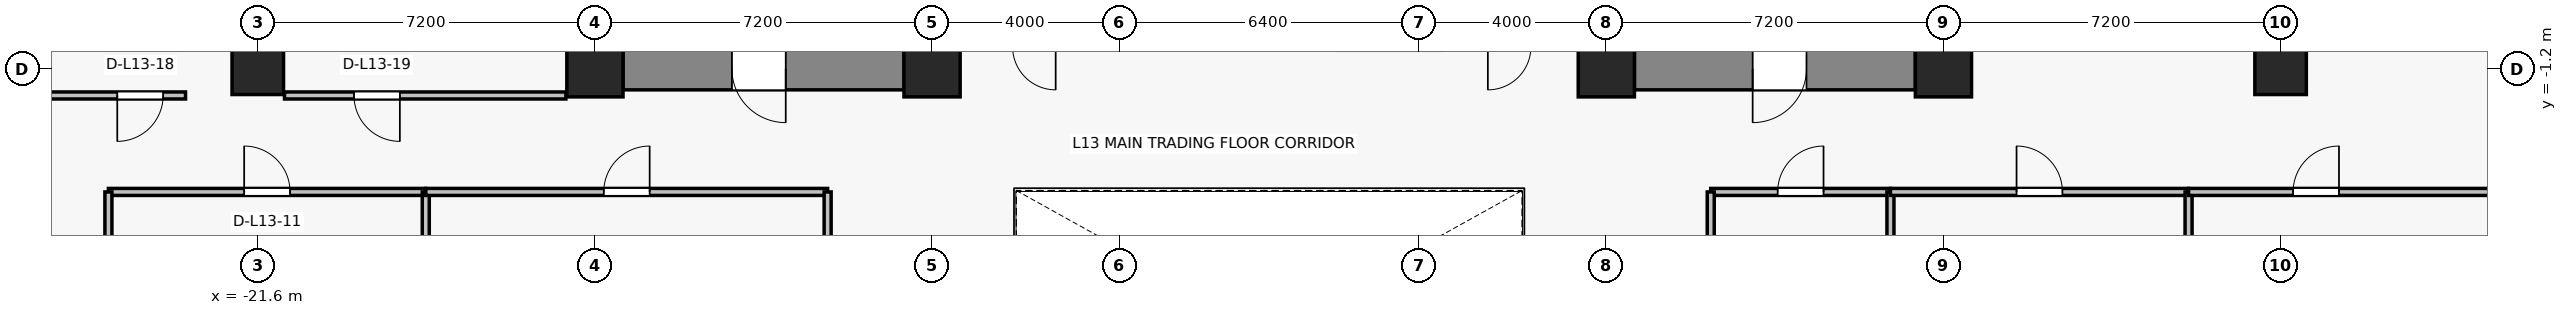
"""IFC4 building model, lengths in metres.
Left out: names, types, materials, properties, quantities, classifications, styles, units other than length and angle.
Written with IfcOpenShell. Run it as: python <this file> out.ifc"""

import sys

from ifc_helpers import new_model, si_unit, direction, frame, frame_2d, origin, origin_2d, place, context, subcontext, project, spatial, rectangle, extrude, source, transform, mapped, element, fill, save


model = new_model("IFC4")
c1 = context("Model", 3, precision=1e-05, world=origin(), true_north=direction((0.0, 1.0)))
c2 = subcontext(c1, "Body", "Model", "MODEL_VIEW")
j1 = project(units=[si_unit("LENGTHUNIT", "METRE"), si_unit("PLANEANGLEUNIT", "RADIAN")], contexts=[c1])
p1 = place(None, origin())
s1 = spatial("IfcSite", under=j1, at=p1, CompositionType="ELEMENT")
p2 = place(p1, origin())
s2 = spatial("IfcBuilding", under=s1, at=p2, CompositionType="ELEMENT")
p3 = place(p2, frame((0.0, 0.0, 50.5)))
s3 = spatial("IfcBuildingStorey", under=s2, at=p3, CompositionType="ELEMENT", Elevation=50.5)
for number, where, z_axis, x_axis in (
    (1, (-14.4, -1.2, 0.0), (0.0, 0.0, 1.0), (1.0, 0.0, 0.0)),
    (2, (-7.2, -1.2, 0.0), (0.0, 0.0, 1.0), (1.0, 0.0, 0.0)),
    (3, (7.2, -1.2, 0.0), (0.0, 0.0, 1.0), (1.0, 0.0, 0.0)),
    (4, (14.4, -1.2, 0.0), (0.0, 0.0, 1.0), (1.0, 0.0, 0.0)),
):
    element("IfcColumn", number, at=place(p3, frame(where, z_axis=z_axis, x_axis=x_axis)), inside=s3, PredefinedType="COLUMN", context=c2, shape_type="SweptSolid", body=[
        extrude(rectangle(XDim=1.2, YDim=1.2, at=origin_2d()), origin(), (0.0, 0.0, 1.0), 3.3),
    ])
for number, where, z_axis, x_axis in (
    (5, (-21.6, -1.2, 0.0), (0.0, 0.0, 1.0), (1.0, 0.0, 0.0)),
    (6, (21.6, -1.2, 0.0), (0.0, 0.0, 1.0), (1.0, 0.0, 0.0)),
):
    element("IfcColumn", number, at=place(p3, frame(where, z_axis=z_axis, x_axis=x_axis)), inside=s3, PredefinedType="COLUMN", context=c2, shape_type="SweptSolid", body=[
        extrude(rectangle(XDim=1.1, YDim=1.1, at=origin_2d()), origin(), (0.0, 0.0, 1.0), 3.3),
    ])
p4 = place(p3, frame((-7.8, -1.2, 0.0), z_axis=(0.0, 0.0, 1.0), x_axis=(-1.0, 0.0, 0.0)))
e7 = element("IfcWall", 7, at=p4, inside=s3, PredefinedType="SHEAR", context=c2, shape_type="SweptSolid", body=[
    extrude(rectangle(XDim=6.0, YDim=0.9, at=frame_2d((3.0, 0.0))), origin(), (0.0, 0.0, 1.0), 3.075),
])
p5 = place(p4, frame((2.525, 0.0, 0.0)))
e8 = element("IfcOpeningElement", 8, at=p5, cuts=e7, PredefinedType="OPENING", context=c2, shape_type="SweptSolid", body=[
    extrude(rectangle(XDim=1.15, YDim=2.15, at=frame_2d((0.575, 1.075))), frame((0.0, 0.46, 0.0), z_axis=(0.0, -1.0, 0.0), x_axis=(1.0, 0.0, 0.0)), (0.0, 0.0, 1.0), 0.92),
])
p6 = place(p3, frame((13.8, -1.2, 0.0), z_axis=(0.0, 0.0, 1.0), x_axis=(-1.0, 0.0, 0.0)))
e9 = element("IfcWall", 9, at=p6, inside=s3, PredefinedType="SHEAR", context=c2, shape_type="SweptSolid", body=[
    extrude(rectangle(XDim=6.0, YDim=0.9, at=frame_2d((3.0, 0.0))), origin(), (0.0, 0.0, 1.0), 3.075),
])
p7 = place(p6, frame((2.325, 0.0, 0.0)))
e10 = element("IfcOpeningElement", 10, at=p7, cuts=e9, PredefinedType="OPENING", context=c2, shape_type="SweptSolid", body=[
    extrude(rectangle(XDim=1.15, YDim=2.15, at=frame_2d((0.575, 1.075))), frame((0.0, 0.46, 0.0), z_axis=(0.0, -1.0, 0.0), x_axis=(1.0, 0.0, 0.0)), (0.0, 0.0, 1.0), 0.92),
])
p8 = place(p3, frame((-24.79, -3.83, 0.0), z_axis=(0.0, 0.0, 1.0), x_axis=(1.0, 0.0, 0.0)))
e11 = element("IfcWall", 11, at=p8, inside=s3, PredefinedType="PARTITIONING", context=c2, shape_type="SweptSolid", body=[
    extrude(rectangle(XDim=6.778, YDim=0.15, at=frame_2d((3.389, 0.0))), origin(), (0.0, 0.0, 1.0), 2.465),
])
p9 = place(p8, frame((2.899, 0.0, 0.0)))
e12 = element("IfcOpeningElement", 12, at=p9, cuts=e11, PredefinedType="OPENING", context=c2, shape_type="SweptSolid", body=[
    extrude(rectangle(XDim=0.98, YDim=2.15, at=frame_2d((0.49, 1.075))), frame((0.0, 0.085, 0.0), z_axis=(0.0, -1.0, 0.0), x_axis=(1.0, 0.0, 0.0)), (0.0, 0.0, 1.0), 0.17),
])
for number, where, z_axis, x_axis in (
    (13, (-24.79, -8.12, 0.0), (0.0, 0.0, 1.0), (0.0, 1.0, 0.0)),
    (14, (-18.012, -3.83, 0.0), (0.0, 0.0, 1.0), (0.0, -1.0, 0.0)),
):
    element("IfcWall", number, at=place(p3, frame(where, z_axis=z_axis, x_axis=x_axis)), inside=s3, PredefinedType="PARTITIONING", context=c2, shape_type="SweptSolid", body=[
        extrude(rectangle(XDim=4.29, YDim=0.15, at=frame_2d((2.145, 0.0))), origin(), (0.0, 0.0, 1.0), 2.565),
    ])
p10 = place(p3, frame((-18.012, -3.83, 0.0), z_axis=(0.0, 0.0, 1.0), x_axis=(1.0, 0.0, 0.0)))
e15 = element("IfcWall", 15, at=p10, inside=s3, PredefinedType="PARTITIONING", context=c2, shape_type="SweptSolid", body=[
    extrude(rectangle(XDim=8.583, YDim=0.15, at=frame_2d((4.291, 0.0))), origin(), (0.0, 0.0, 1.0), 2.465),
])
p11 = place(p10, frame((3.802, 0.0, 0.0)))
e16 = element("IfcOpeningElement", 16, at=p11, cuts=e15, PredefinedType="OPENING", context=c2, shape_type="SweptSolid", body=[
    extrude(rectangle(XDim=0.98, YDim=2.15, at=frame_2d((0.49, 1.075))), frame((0.0, 0.085, 0.0), z_axis=(0.0, -1.0, 0.0), x_axis=(1.0, 0.0, 0.0)), (0.0, 0.0, 1.0), 0.17),
])
p12 = place(p3, frame((-9.43, -3.83, 0.0), z_axis=(0.0, 0.0, 1.0), x_axis=(0.0, -1.0, 0.0)))
e17 = element("IfcWall", 17, at=p12, inside=s3, PredefinedType="PARTITIONING", context=c2, shape_type="SweptSolid", body=[
    extrude(rectangle(XDim=4.29, YDim=0.15, at=frame_2d((2.145, 0.0))), origin(), (0.0, 0.0, 1.0), 2.565),
])
p13 = place(p3, frame((9.43, -3.83, 0.0), z_axis=(0.0, 0.0, 1.0), x_axis=(1.0, 0.0, 0.0)))
e18 = element("IfcWall", 18, at=p13, inside=s3, PredefinedType="PARTITIONING", context=c2, shape_type="SweptSolid", body=[
    extrude(rectangle(XDim=3.838, YDim=0.15, at=frame_2d((1.919, 0.0))), origin(), (0.0, 0.0, 1.0), 3.075),
])
p14 = place(p13, frame((1.429, 0.0, 0.0)))
e19 = element("IfcOpeningElement", 19, at=p14, cuts=e18, PredefinedType="OPENING", context=c2, shape_type="SweptSolid", body=[
    extrude(rectangle(XDim=0.98, YDim=2.15, at=frame_2d((0.49, 1.075))), frame((0.0, 0.085, 0.0), z_axis=(0.0, -1.0, 0.0), x_axis=(1.0, 0.0, 0.0)), (0.0, 0.0, 1.0), 0.17),
])
for number, where, z_axis, x_axis in (
    (20, (9.43, -8.12, 0.0), (0.0, 0.0, 1.0), (0.0, 1.0, 0.0)),
    (21, (13.268, -3.83, 0.0), (0.0, 0.0, 1.0), (0.0, -1.0, 0.0)),
):
    element("IfcWall", number, at=place(p3, frame(where, z_axis=z_axis, x_axis=x_axis)), inside=s3, PredefinedType="PARTITIONING", context=c2, shape_type="SweptSolid", body=[
        extrude(rectangle(XDim=4.29, YDim=0.15, at=frame_2d((2.145, 0.0))), origin(), (0.0, 0.0, 1.0), 2.565),
    ])
p15 = place(p3, frame((13.268, -3.83, 0.0), z_axis=(0.0, 0.0, 1.0), x_axis=(1.0, 0.0, 0.0)))
e22 = element("IfcWall", 22, at=p15, inside=s3, PredefinedType="PARTITIONING", context=c2, shape_type="SweptSolid", body=[
    extrude(rectangle(XDim=6.367, YDim=0.15, at=frame_2d((3.183, 0.0))), origin(), (0.0, 0.0, 1.0), 2.465),
])
p16 = place(p15, frame((2.693, 0.0, 0.0)))
e23 = element("IfcOpeningElement", 23, at=p16, cuts=e22, PredefinedType="OPENING", context=c2, shape_type="SweptSolid", body=[
    extrude(rectangle(XDim=0.98, YDim=2.15, at=frame_2d((0.49, 1.075))), frame((0.0, 0.085, 0.0), z_axis=(0.0, -1.0, 0.0), x_axis=(1.0, 0.0, 0.0)), (0.0, 0.0, 1.0), 0.17),
])
p17 = place(p3, frame((19.635, -3.83, 0.0), z_axis=(0.0, 0.0, 1.0), x_axis=(0.0, -1.0, 0.0)))
e24 = element("IfcWall", 24, at=p17, inside=s3, PredefinedType="PARTITIONING", context=c2, shape_type="SweptSolid", body=[
    extrude(rectangle(XDim=4.29, YDim=0.15, at=frame_2d((2.145, 0.0))), origin(), (0.0, 0.0, 1.0), 2.565),
])
p18 = place(p3, frame((19.635, -3.83, 0.0), z_axis=(0.0, 0.0, 1.0), x_axis=(1.0, 0.0, 0.0)))
e25 = element("IfcWall", 25, at=p18, inside=s3, PredefinedType="PARTITIONING", context=c2, shape_type="SweptSolid", body=[
    extrude(rectangle(XDim=8.895, YDim=0.15, at=frame_2d((4.448, 0.0))), origin(), (0.0, 0.0, 1.0), 2.465),
])
p19 = place(p18, frame((2.232, 0.0, 0.0)))
e26 = element("IfcOpeningElement", 26, at=p19, cuts=e25, PredefinedType="OPENING", context=c2, shape_type="SweptSolid", body=[
    extrude(rectangle(XDim=0.98, YDim=2.15, at=frame_2d((0.49, 1.075))), frame((0.0, 0.085, 0.0), z_axis=(0.0, -1.0, 0.0), x_axis=(1.0, 0.0, 0.0)), (0.0, 0.0, 1.0), 0.17),
])
p20 = place(p3, frame((-23.143, -1.77, 0.0), z_axis=(0.0, 0.0, 1.0), x_axis=(-1.0, 0.0, 0.0)))
e27 = element("IfcWall", 27, at=p20, inside=s3, PredefinedType="PARTITIONING", context=c2, shape_type="SweptSolid", body=[
    extrude(rectangle(XDim=5.853, YDim=0.15, at=frame_2d((2.927, 0.0))), origin(), (0.0, 0.0, 1.0), 2.465),
])
p21 = place(p20, frame((0.478, 0.0, 0.0)))
e28 = element("IfcOpeningElement", 28, at=p21, cuts=e27, PredefinedType="OPENING", context=c2, shape_type="SweptSolid", body=[
    extrude(rectangle(XDim=0.98, YDim=2.15, at=frame_2d((0.49, 1.075))), frame((0.0, 0.085, 0.0), z_axis=(0.0, -1.0, 0.0), x_axis=(1.0, 0.0, 0.0)), (0.0, 0.0, 1.0), 0.17),
])
p22 = place(p3, frame((-15.02, -1.77, 0.0), z_axis=(0.0, 0.0, 1.0), x_axis=(-1.0, 0.0, 0.0)))
e29 = element("IfcWall", 29, at=p22, inside=s3, PredefinedType="PARTITIONING", context=c2, shape_type="SweptSolid", body=[
    extrude(rectangle(XDim=6.01, YDim=0.15, at=frame_2d((3.005, 0.0))), origin(), (0.0, 0.0, 1.0), 3.075),
])
p23 = place(p22, frame((3.546, 0.0, 0.0)))
e30 = element("IfcOpeningElement", 30, at=p23, cuts=e29, PredefinedType="OPENING", context=c2, shape_type="SweptSolid", body=[
    extrude(rectangle(XDim=0.98, YDim=2.15, at=frame_2d((0.49, 1.075))), frame((0.0, 0.085, 0.0), z_axis=(0.0, -1.0, 0.0), x_axis=(1.0, 0.0, 0.0)), (0.0, 0.0, 1.0), 0.17),
])
m1 = source(origin(), c2, "Body", "SweptSolid", [
    extrude(rectangle(XDim=1.15, YDim=2.15, at=frame_2d((0.575, 1.075))), frame((0.0, 0.025, 0.0), z_axis=(0.0, -1.0, 0.0), x_axis=(1.0, 0.0, 0.0)), (0.0, 0.0, 1.0), 0.05),
])
p24 = place(p5, origin())
e31 = element("IfcDoor", 31, at=p24, inside=s3, OperationType="SINGLE_SWING_LEFT", PredefinedType="DOOR", context=c2, shape_type="MappedRepresentation", body=[
    mapped(m1, transform((0.0, 0.0, 0.0), x_axis=(1.0, 0.0, 0.0), y_axis=(0.0, 1.0, 0.0), z_axis=(0.0, 0.0, 1.0), scale=1.0)),
])
fill(e8, e31)
p25 = place(p7, origin())
e32 = element("IfcDoor", 32, at=p25, inside=s3, OperationType="SINGLE_SWING_RIGHT", PredefinedType="DOOR", context=c2, shape_type="MappedRepresentation", body=[
    mapped(m1, transform((0.0, 0.0, 0.0), x_axis=(1.0, 0.0, 0.0), y_axis=(0.0, 1.0, 0.0), z_axis=(0.0, 0.0, 1.0), scale=1.0)),
])
fill(e10, e32)
m2 = source(origin(), c2, "Body", "SweptSolid", [
    extrude(rectangle(XDim=0.98, YDim=2.15, at=frame_2d((0.49, 1.075))), frame((0.0, 0.025, 0.0), z_axis=(0.0, -1.0, 0.0), x_axis=(1.0, 0.0, 0.0)), (0.0, 0.0, 1.0), 0.05),
])
p26 = place(p9, origin())
e33 = element("IfcDoor", 33, at=p26, inside=s3, OperationType="SINGLE_SWING_LEFT", PredefinedType="DOOR", context=c2, shape_type="MappedRepresentation", body=[
    mapped(m2, transform((0.0, 0.0, 0.0), x_axis=(1.0, 0.0, 0.0), y_axis=(0.0, 1.0, 0.0), z_axis=(0.0, 0.0, 1.0), scale=1.0)),
])
fill(e12, e33)
p27 = place(p11, origin())
e34 = element("IfcDoor", 34, at=p27, inside=s3, OperationType="SINGLE_SWING_RIGHT", PredefinedType="DOOR", context=c2, shape_type="MappedRepresentation", body=[
    mapped(m2, transform((0.0, 0.0, 0.0), x_axis=(1.0, 0.0, 0.0), y_axis=(0.0, 1.0, 0.0), z_axis=(0.0, 0.0, 1.0), scale=1.0)),
])
fill(e16, e34)
p28 = place(p14, origin())
e35 = element("IfcDoor", 35, at=p28, inside=s3, OperationType="SINGLE_SWING_RIGHT", PredefinedType="DOOR", context=c2, shape_type="MappedRepresentation", body=[
    mapped(m2, transform((0.0, 0.0, 0.0), x_axis=(1.0, 0.0, 0.0), y_axis=(0.0, 1.0, 0.0), z_axis=(0.0, 0.0, 1.0), scale=1.0)),
])
fill(e19, e35)
p29 = place(p16, origin())
e36 = element("IfcDoor", 36, at=p29, inside=s3, OperationType="SINGLE_SWING_LEFT", PredefinedType="DOOR", context=c2, shape_type="MappedRepresentation", body=[
    mapped(m2, transform((0.0, 0.0, 0.0), x_axis=(1.0, 0.0, 0.0), y_axis=(0.0, 1.0, 0.0), z_axis=(0.0, 0.0, 1.0), scale=1.0)),
])
fill(e23, e36)
p30 = place(p19, origin())
e37 = element("IfcDoor", 37, at=p30, inside=s3, OperationType="SINGLE_SWING_RIGHT", PredefinedType="DOOR", context=c2, shape_type="MappedRepresentation", body=[
    mapped(m2, transform((0.0, 0.0, 0.0), x_axis=(1.0, 0.0, 0.0), y_axis=(0.0, 1.0, 0.0), z_axis=(0.0, 0.0, 1.0), scale=1.0)),
])
fill(e26, e37)
p31 = place(p21, origin())
e38 = element("IfcDoor", 38, at=p31, inside=s3, OperationType="SINGLE_SWING_RIGHT", PredefinedType="DOOR", context=c2, shape_type="MappedRepresentation", body=[
    mapped(m2, transform((0.0, 0.0, 0.0), x_axis=(1.0, 0.0, 0.0), y_axis=(0.0, 1.0, 0.0), z_axis=(0.0, 0.0, 1.0), scale=1.0)),
])
fill(e28, e38)
p32 = place(p23, origin())
e39 = element("IfcDoor", 39, at=p32, inside=s3, OperationType="SINGLE_SWING_LEFT", PredefinedType="DOOR", context=c2, shape_type="MappedRepresentation", body=[
    mapped(m2, transform((0.0, 0.0, 0.0), x_axis=(1.0, 0.0, 0.0), y_axis=(0.0, 1.0, 0.0), z_axis=(0.0, 0.0, 1.0), scale=1.0)),
])
fill(e30, e39)
save(model, sys.argv[1])
